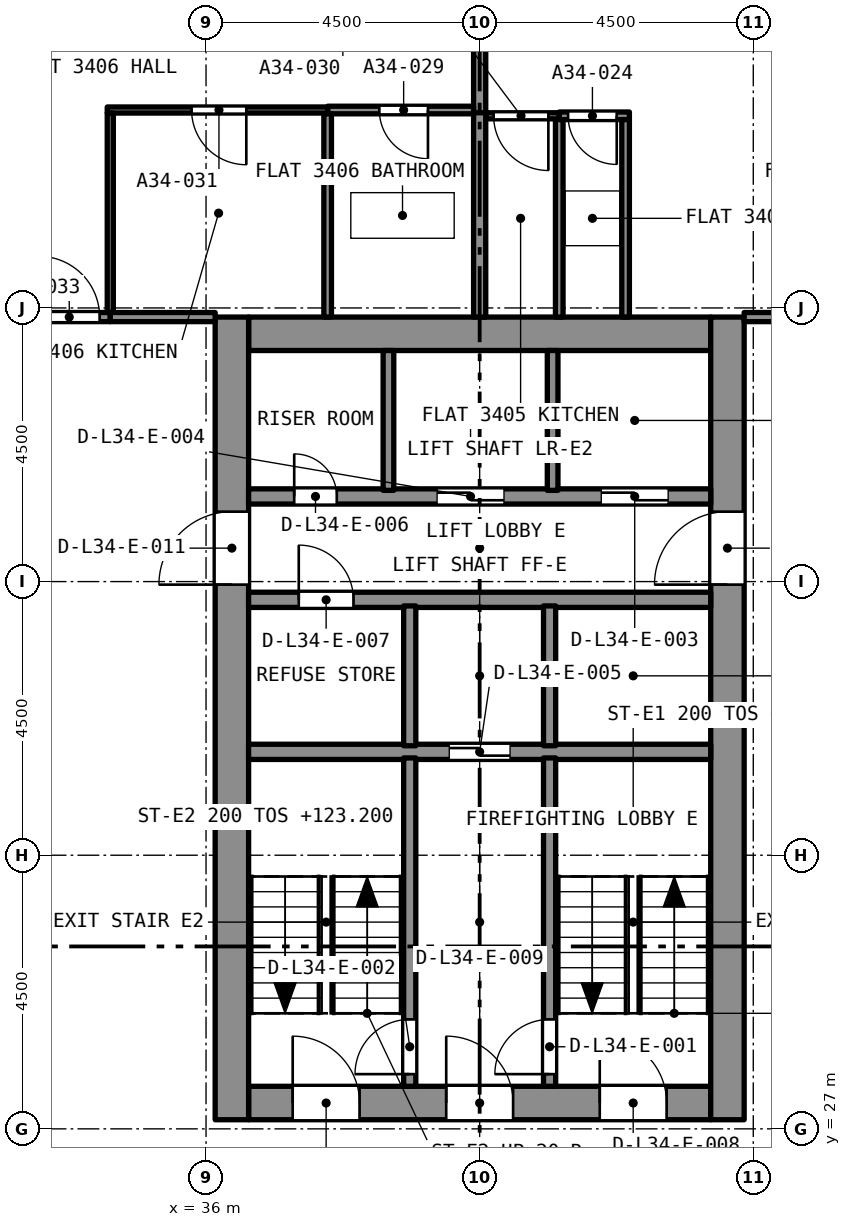
"""IFC4 building model, lengths in metres.
Left out: names, types, materials, properties, quantities, classifications, styles, units other than length and angle.
Written with IfcOpenShell. Run it as: python <this file> out.ifc"""

import sys

from ifc_helpers import new_model, si_unit, direction, frame, frame_2d, origin, place, context, subcontext, project, spatial, rectangle, extrude, element, fill, save


model = new_model("IFC4")
c1 = context("Model", 3, precision=1e-05, world=origin(), true_north=direction((0.0, 1.0)))
c2 = subcontext(c1, "Body", "Model", "MODEL_VIEW")
j1 = project(units=[si_unit("LENGTHUNIT", "METRE"), si_unit("PLANEANGLEUNIT", "RADIAN")], contexts=[c1])
p1 = place(None, origin())
s1 = spatial("IfcSite", under=j1, at=p1, CompositionType="ELEMENT")
p2 = place(p1, origin())
s2 = spatial("IfcBuilding", under=s1, at=p2, CompositionType="ELEMENT")
p3 = place(p2, frame((0.0, 0.0, 121.6)))
s3 = spatial("IfcBuildingStorey", under=s2, at=p3, CompositionType="ELEMENT", Elevation=121.6)
p4 = place(p3, frame((36.7, 27.425, 0.0), z_axis=(0.0, 0.0, 1.0), x_axis=(1.0, 0.0, 0.0)))
e1 = element("IfcWall", 1, at=p4, inside=s3, PredefinedType="SOLIDWALL", context=c2, shape_type="SweptSolid", body=[
    extrude(rectangle(XDim=7.6, YDim=0.55, at=frame_2d((3.8, 0.0))), origin(), (0.0, 0.0, 1.0), 3.2),
])
p5 = place(p4, frame((5.775, 0.0, 0.0)))
e2 = element("IfcOpeningElement", 2, at=p5, cuts=e1, PredefinedType="OPENING", context=c2, shape_type="SweptSolid", body=[
    extrude(rectangle(XDim=1.1, YDim=2.1, at=frame_2d((0.55, 1.05))), frame((0.0, 0.285, 0.0), z_axis=(0.0, -1.0, 0.0), x_axis=(1.0, 0.0, 0.0)), (0.0, 0.0, 1.0), 0.57),
])
p6 = place(p4, frame((3.25, 0.0, 0.0)))
e3 = element("IfcOpeningElement", 3, at=p6, cuts=e1, PredefinedType="OPENING", context=c2, shape_type="SweptSolid", body=[
    extrude(rectangle(XDim=1.1, YDim=2.1, at=frame_2d((0.55, 1.05))), frame((0.0, 0.285, 0.0), z_axis=(0.0, -1.0, 0.0), x_axis=(1.0, 0.0, 0.0)), (0.0, 0.0, 1.0), 0.57),
])
p7 = place(p4, frame((0.725, 0.0, 0.0)))
e4 = element("IfcOpeningElement", 4, at=p7, cuts=e1, PredefinedType="OPENING", context=c2, shape_type="SweptSolid", body=[
    extrude(rectangle(XDim=1.1, YDim=2.1, at=frame_2d((0.55, 1.05))), frame((0.0, 0.285, 0.0), z_axis=(0.0, -1.0, 0.0), x_axis=(1.0, 0.0, 0.0)), (0.0, 0.0, 1.0), 0.57),
])
p8 = place(p3, frame((36.7, 40.075, 0.0), z_axis=(0.0, 0.0, 1.0), x_axis=(1.0, 0.0, 0.0)))
e5 = element("IfcWall", 5, at=p8, inside=s3, PredefinedType="SOLIDWALL", context=c2, shape_type="SweptSolid", body=[
    extrude(rectangle(XDim=7.6, YDim=0.55, at=frame_2d((3.8, 0.0))), origin(), (0.0, 0.0, 1.0), 3.2),
])
p9 = place(p3, frame((36.425, 27.15, 0.0), z_axis=(0.0, 0.0, 1.0), x_axis=(0.0, 1.0, 0.0)))
e6 = element("IfcWall", 6, at=p9, inside=s3, PredefinedType="SOLIDWALL", context=c2, shape_type="SweptSolid", body=[
    extrude(rectangle(XDim=13.2, YDim=0.55, at=frame_2d((6.6, 0.0))), origin(), (0.0, 0.0, 1.0), 3.2),
])
p10 = place(p9, frame((8.8, 0.0, 0.0)))
e7 = element("IfcOpeningElement", 7, at=p10, cuts=e6, PredefinedType="OPENING", context=c2, shape_type="SweptSolid", body=[
    extrude(rectangle(XDim=1.2, YDim=2.1, at=frame_2d((0.6, 1.05))), frame((0.0, 0.285, 0.0), z_axis=(0.0, -1.0, 0.0), x_axis=(1.0, 0.0, 0.0)), (0.0, 0.0, 1.0), 0.57),
])
p11 = place(p3, frame((44.575, 27.15, 0.0), z_axis=(0.0, 0.0, 1.0), x_axis=(0.0, 1.0, 0.0)))
e8 = element("IfcWall", 8, at=p11, inside=s3, PredefinedType="SOLIDWALL", context=c2, shape_type="SweptSolid", body=[
    extrude(rectangle(XDim=13.2, YDim=0.55, at=frame_2d((6.6, 0.0))), origin(), (0.0, 0.0, 1.0), 3.2),
])
p12 = place(p11, frame((8.8, 0.0, 0.0)))
e9 = element("IfcOpeningElement", 9, at=p12, cuts=e8, PredefinedType="OPENING", context=c2, shape_type="SweptSolid", body=[
    extrude(rectangle(XDim=1.2, YDim=2.1, at=frame_2d((0.6, 1.05))), frame((0.0, 0.285, 0.0), z_axis=(0.0, -1.0, 0.0), x_axis=(1.0, 0.0, 0.0)), (0.0, 0.0, 1.0), 0.57),
])
p13 = place(p3, frame((42.962, 43.66, 0.0), z_axis=(0.0, 0.0, 1.0), x_axis=(-1.0, 0.0, 0.0)))
e10 = element("IfcWall", 10, at=p13, inside=s3, PredefinedType="PARTITIONING", context=c2, shape_type="SweptSolid", body=[
    extrude(rectangle(XDim=1.153, YDim=0.125, at=frame_2d((0.577, 0.0))), origin(), (0.0, 0.0, 1.0), 2.85),
])
p14 = place(p13, frame((0.208, 0.0, 0.0)))
e11 = element("IfcOpeningElement", 11, at=p14, cuts=e10, PredefinedType="OPENING", context=c2, shape_type="SweptSolid", body=[
    extrude(rectangle(XDim=0.8, YDim=2.1, at=frame_2d((0.4, 1.05))), frame((0.0, 0.073, 0.0), z_axis=(0.0, -1.0, 0.0), x_axis=(1.0, 0.0, 0.0)), (0.0, 0.0, 1.0), 0.145),
])
for number, where, z_axis, x_axis in (
    (12, (42.9, 40.35, 0.0), (0.0, 0.0, 1.0), (0.0, 1.0, 0.0)),
    (13, (41.809, 40.35, 0.0), (0.0, 0.0, 1.0), (0.0, 1.0, 0.0)),
):
    element("IfcWall", number, at=place(p3, frame(where, z_axis=z_axis, x_axis=x_axis)), inside=s3, PredefinedType="PARTITIONING", context=c2, shape_type="SweptSolid", body=[
        extrude(rectangle(XDim=3.247, YDim=0.125, at=frame_2d((1.624, 0.0))), origin(), (0.0, 0.0, 1.0), 2.85),
    ])
p15 = place(p3, frame((41.809, 43.66, 0.0), z_axis=(0.0, 0.0, 1.0), x_axis=(-1.0, 0.0, 0.0)))
e14 = element("IfcWall", 14, at=p15, inside=s3, PredefinedType="PARTITIONING", context=c2, shape_type="SweptSolid", body=[
    extrude(rectangle(XDim=1.209, YDim=0.1, at=frame_2d((0.604, 0.0))), origin(), (0.0, 0.0, 1.0), 2.85),
])
p16 = place(p15, frame((0.179, 0.0, 0.0)))
e15 = element("IfcOpeningElement", 15, at=p16, cuts=e14, PredefinedType="OPENING", context=c2, shape_type="SweptSolid", body=[
    extrude(rectangle(XDim=0.9, YDim=2.1, at=frame_2d((0.45, 1.05))), frame((0.0, 0.06, 0.0), z_axis=(0.0, -1.0, 0.0), x_axis=(1.0, 0.0, 0.0)), (0.0, 0.0, 1.0), 0.12),
])
p17 = place(p3, frame((40.5, 43.692, 0.0), z_axis=(0.0, 0.0, 1.0), x_axis=(0.0, 1.0, 0.0)))
e16 = element("IfcWall", 16, at=p17, inside=s3, PredefinedType="PARTITIONING", context=c2, shape_type="SweptSolid", body=[
    extrude(rectangle(XDim=1.358, YDim=0.2, at=frame_2d((0.679, 0.0))), origin(), (0.0, 0.0, 1.0), 2.85),
])
p18 = place(p3, frame((44.85, 40.35, 0.0), z_axis=(0.0, 0.0, 1.0), x_axis=(1.0, 0.0, 0.0)))
e17 = element("IfcWall", 17, at=p18, inside=s3, PredefinedType="PARTITIONING", context=c2, shape_type="SweptSolid", body=[
    extrude(rectangle(XDim=4.075, YDim=0.15, at=frame_2d((2.038, 0.0))), origin(), (0.0, 0.0, 1.0), 2.85),
])
p19 = place(p18, frame((1.9, 0.0, 0.0)))
e18 = element("IfcOpeningElement", 18, at=p19, cuts=e17, PredefinedType="OPENING", context=c2, shape_type="SweptSolid", body=[
    extrude(rectangle(XDim=1.0, YDim=2.1, at=frame_2d((0.5, 1.05))), frame((0.0, 0.085, 0.0), z_axis=(0.0, -1.0, 0.0), x_axis=(1.0, 0.0, 0.0)), (0.0, 0.0, 1.0), 0.17),
])
p20 = place(p3, frame((40.5, 40.35, 0.0), z_axis=(0.0, 0.0, 1.0), x_axis=(0.0, 1.0, 0.0)))
e19 = element("IfcWall", 19, at=p20, inside=s3, PredefinedType="PARTITIONING", context=c2, shape_type="SweptSolid", body=[
    extrude(rectangle(XDim=3.36, YDim=0.2, at=frame_2d((1.68, 0.0))), origin(), (0.0, 0.0, 1.0), 2.85),
])
p21 = place(p3, frame((40.4, 43.755, 0.0), z_axis=(0.0, 0.0, 1.0), x_axis=(-1.0, 0.0, 0.0)))
e20 = element("IfcWall", 20, at=p21, inside=s3, PredefinedType="PARTITIONING", context=c2, shape_type="SweptSolid", body=[
    extrude(rectangle(XDim=2.4, YDim=0.125, at=frame_2d((1.2, 0.0))), origin(), (0.0, 0.0, 1.0), 2.85),
])
p22 = place(p21, frame((0.75, 0.0, 0.0)))
e21 = element("IfcOpeningElement", 21, at=p22, cuts=e20, PredefinedType="OPENING", context=c2, shape_type="SweptSolid", body=[
    extrude(rectangle(XDim=0.8, YDim=2.1, at=frame_2d((0.4, 1.05))), frame((0.0, 0.073, 0.0), z_axis=(0.0, -1.0, 0.0), x_axis=(1.0, 0.0, 0.0)), (0.0, 0.0, 1.0), 0.145),
])
p23 = place(p3, frame((38.0, 40.35, 0.0), z_axis=(0.0, 0.0, 1.0), x_axis=(0.0, 1.0, 0.0)))
e22 = element("IfcWall", 22, at=p23, inside=s3, PredefinedType="PARTITIONING", context=c2, shape_type="SweptSolid", body=[
    extrude(rectangle(XDim=3.342, YDim=0.125, at=frame_2d((1.671, 0.0))), origin(), (0.0, 0.0, 1.0), 2.85),
])
p24 = place(p3, frame((38.0, 43.755, 0.0), z_axis=(0.0, 0.0, 1.0), x_axis=(-1.0, 0.0, 0.0)))
e23 = element("IfcWall", 23, at=p24, inside=s3, PredefinedType="PARTITIONING", context=c2, shape_type="SweptSolid", body=[
    extrude(rectangle(XDim=3.625, YDim=0.1, at=frame_2d((1.812, 0.0))), origin(), (0.0, 0.0, 1.0), 2.85),
])
p25 = place(p24, frame((1.337, 0.0, 0.0)))
e24 = element("IfcOpeningElement", 24, at=p25, cuts=e23, PredefinedType="OPENING", context=c2, shape_type="SweptSolid", body=[
    extrude(rectangle(XDim=0.9, YDim=2.1, at=frame_2d((0.45, 1.05))), frame((0.0, 0.06, 0.0), z_axis=(0.0, -1.0, 0.0), x_axis=(1.0, 0.0, 0.0)), (0.0, 0.0, 1.0), 0.12),
])
p26 = place(p3, frame((34.425, 40.425, 0.0), z_axis=(0.0, 0.0, 1.0), x_axis=(0.0, 1.0, 0.0)))
e25 = element("IfcWall", 25, at=p26, inside=s3, PredefinedType="PARTITIONING", context=c2, shape_type="SweptSolid", body=[
    extrude(rectangle(XDim=3.28, YDim=0.1, at=frame_2d((1.64, 0.0))), origin(), (0.0, 0.0, 1.0), 2.85),
])
p27 = place(p3, frame((32.075, 40.35, 0.0), z_axis=(0.0, 0.0, 1.0), x_axis=(1.0, 0.0, 0.0)))
e26 = element("IfcWall", 26, at=p27, inside=s3, PredefinedType="PARTITIONING", context=c2, shape_type="SweptSolid", body=[
    extrude(rectangle(XDim=2.35, YDim=0.15, at=frame_2d((1.175, 0.0))), origin(), (0.0, 0.0, 1.0), 2.85),
])
p28 = place(p27, frame((1.175, 0.0, 0.0)))
e27 = element("IfcOpeningElement", 27, at=p28, cuts=e26, PredefinedType="OPENING", context=c2, shape_type="SweptSolid", body=[
    extrude(rectangle(XDim=1.0, YDim=2.1, at=frame_2d((0.5, 1.05))), frame((0.0, 0.085, 0.0), z_axis=(0.0, -1.0, 0.0), x_axis=(1.0, 0.0, 0.0)), (0.0, 0.0, 1.0), 0.17),
])
p29 = place(p3, frame((34.425, 40.35, 0.0), z_axis=(0.0, 0.0, 1.0), x_axis=(1.0, 0.0, 0.0)))
e28 = element("IfcWall", 28, at=p29, inside=s3, PredefinedType="PARTITIONING", context=c2, shape_type="SweptSolid", body=[
    extrude(rectangle(XDim=1.725, YDim=0.15, at=frame_2d((0.862, 0.0))), origin(), (0.0, 0.0, 1.0), 2.85),
])
p30 = place(p3, frame((36.7, 33.2, 0.0), z_axis=(0.0, 0.0, 1.0), x_axis=(1.0, 0.0, 0.0)))
e29 = element("IfcWall", 29, at=p30, inside=s3, PredefinedType="SOLIDWALL", context=c2, shape_type="SweptSolid", body=[
    extrude(rectangle(XDim=7.6, YDim=0.25, at=frame_2d((3.8, 0.0))), origin(), (0.0, 0.0, 1.0), 2.85),
])
p31 = place(p30, frame((3.3, 0.0, 0.0)))
e30 = element("IfcOpeningElement", 30, at=p31, cuts=e29, PredefinedType="OPENING", context=c2, shape_type="SweptSolid", body=[
    extrude(rectangle(XDim=1.0, YDim=2.1, at=frame_2d((0.5, 1.05))), frame((0.0, 0.135, 0.0), z_axis=(0.0, -1.0, 0.0), x_axis=(1.0, 0.0, 0.0)), (0.0, 0.0, 1.0), 0.27),
])
p32 = place(p3, frame((36.7, 35.7, 0.0), z_axis=(0.0, 0.0, 1.0), x_axis=(1.0, 0.0, 0.0)))
e31 = element("IfcWall", 31, at=p32, inside=s3, PredefinedType="SOLIDWALL", context=c2, shape_type="SweptSolid", body=[
    extrude(rectangle(XDim=7.6, YDim=0.25, at=frame_2d((3.8, 0.0))), origin(), (0.0, 0.0, 1.0), 2.85),
])
p33 = place(p32, frame((0.825, 0.0, 0.0)))
e32 = element("IfcOpeningElement", 32, at=p33, cuts=e31, PredefinedType="OPENING", context=c2, shape_type="SweptSolid", body=[
    extrude(rectangle(XDim=0.9, YDim=2.1, at=frame_2d((0.45, 1.05))), frame((0.0, 0.135, 0.0), z_axis=(0.0, -1.0, 0.0), x_axis=(1.0, 0.0, 0.0)), (0.0, 0.0, 1.0), 0.27),
])
p34 = place(p3, frame((36.7, 37.4, 0.0), z_axis=(0.0, 0.0, 1.0), x_axis=(1.0, 0.0, 0.0)))
e33 = element("IfcWall", 33, at=p34, inside=s3, PredefinedType="SOLIDWALL", context=c2, shape_type="SweptSolid", body=[
    extrude(rectangle(XDim=7.6, YDim=0.25, at=frame_2d((3.8, 0.0))), origin(), (0.0, 0.0, 1.0), 2.85),
])
p35 = place(p34, frame((5.8, 0.0, 0.0)))
e34 = element("IfcOpeningElement", 34, at=p35, cuts=e33, PredefinedType="OPENING", context=c2, shape_type="SweptSolid", body=[
    extrude(rectangle(XDim=1.1, YDim=2.4, at=frame_2d((0.55, 1.2))), frame((0.0, 0.135, 0.0), z_axis=(0.0, -1.0, 0.0), x_axis=(1.0, 0.0, 0.0)), (0.0, 0.0, 1.0), 0.27),
])
p36 = place(p34, frame((3.1, 0.0, 0.0)))
e35 = element("IfcOpeningElement", 35, at=p36, cuts=e33, PredefinedType="OPENING", context=c2, shape_type="SweptSolid", body=[
    extrude(rectangle(XDim=1.1, YDim=2.4, at=frame_2d((0.55, 1.2))), frame((0.0, 0.135, 0.0), z_axis=(0.0, -1.0, 0.0), x_axis=(1.0, 0.0, 0.0)), (0.0, 0.0, 1.0), 0.27),
])
p37 = place(p34, frame((0.75, 0.0, 0.0)))
e36 = element("IfcOpeningElement", 36, at=p37, cuts=e33, PredefinedType="OPENING", context=c2, shape_type="SweptSolid", body=[
    extrude(rectangle(XDim=0.7, YDim=2.1, at=frame_2d((0.35, 1.05))), frame((0.0, 0.135, 0.0), z_axis=(0.0, -1.0, 0.0), x_axis=(1.0, 0.0, 0.0)), (0.0, 0.0, 1.0), 0.27),
])
p38 = place(p3, frame((41.65, 27.7, 0.0), z_axis=(0.0, 0.0, 1.0), x_axis=(0.0, 1.0, 0.0)))
e37 = element("IfcWall", 37, at=p38, inside=s3, PredefinedType="SOLIDWALL", context=c2, shape_type="SweptSolid", body=[
    extrude(rectangle(XDim=5.4, YDim=0.2, at=frame_2d((2.7, 0.0))), origin(), (0.0, 0.0, 1.0), 2.85),
])
p39 = place(p38, frame((0.2, 0.0, 0.0)))
e38 = element("IfcOpeningElement", 38, at=p39, cuts=e37, PredefinedType="OPENING", context=c2, shape_type="SweptSolid", body=[
    extrude(rectangle(XDim=0.9, YDim=2.1, at=frame_2d((0.45, 1.05))), frame((0.0, 0.11, 0.0), z_axis=(0.0, -1.0, 0.0), x_axis=(1.0, 0.0, 0.0)), (0.0, 0.0, 1.0), 0.22),
])
p40 = place(p3, frame((39.35, 27.7, 0.0), z_axis=(0.0, 0.0, 1.0), x_axis=(0.0, 1.0, 0.0)))
e39 = element("IfcWall", 39, at=p40, inside=s3, PredefinedType="SOLIDWALL", context=c2, shape_type="SweptSolid", body=[
    extrude(rectangle(XDim=5.4, YDim=0.2, at=frame_2d((2.7, 0.0))), origin(), (0.0, 0.0, 1.0), 2.85),
])
p41 = place(p40, frame((0.2, 0.0, 0.0)))
e40 = element("IfcOpeningElement", 40, at=p41, cuts=e39, PredefinedType="OPENING", context=c2, shape_type="SweptSolid", body=[
    extrude(rectangle(XDim=0.9, YDim=2.1, at=frame_2d((0.45, 1.05))), frame((0.0, 0.11, 0.0), z_axis=(0.0, -1.0, 0.0), x_axis=(1.0, 0.0, 0.0)), (0.0, 0.0, 1.0), 0.22),
])
for number, where, z_axis, x_axis in (
    (41, (41.65, 33.3, 0.0), (0.0, 0.0, 1.0), (0.0, 1.0, 0.0)),
    (42, (39.35, 33.3, 0.0), (0.0, 0.0, 1.0), (0.0, 1.0, 0.0)),
):
    element("IfcWall", number, at=place(p3, frame(where, z_axis=z_axis, x_axis=x_axis)), inside=s3, PredefinedType="SOLIDWALL", context=c2, shape_type="SweptSolid", body=[
        extrude(rectangle(XDim=2.3, YDim=0.2, at=frame_2d((1.15, 0.0))), origin(), (0.0, 0.0, 1.0), 2.85),
    ])
for number, where, z_axis, x_axis in (
    (43, (41.7, 37.5, 0.0), (0.0, 0.0, 1.0), (0.0, 1.0, 0.0)),
    (44, (39.0, 37.5, 0.0), (0.0, 0.0, 1.0), (0.0, 1.0, 0.0)),
):
    element("IfcWall", number, at=place(p3, frame(where, z_axis=z_axis, x_axis=x_axis)), inside=s3, PredefinedType="SOLIDWALL", context=c2, shape_type="SweptSolid", body=[
        extrude(rectangle(XDim=2.3, YDim=0.175, at=frame_2d((1.15, 0.0))), origin(), (0.0, 0.0, 1.0), 2.85),
    ])
p42 = place(p14, origin())
e45 = element("IfcDoor", 45, at=p42, inside=s3, OperationType="SINGLE_SWING_RIGHT", PredefinedType="DOOR", context=c2, shape_type="SweptSolid", body=[
    extrude(rectangle(XDim=0.8, YDim=2.1, at=frame_2d((0.4, 1.05))), frame((0.0, 0.025, 0.0), z_axis=(0.0, -1.0, 0.0), x_axis=(1.0, 0.0, 0.0)), (0.0, 0.0, 1.0), 0.05),
])
fill(e11, e45)
p43 = place(p16, origin())
e46 = element("IfcDoor", 46, at=p43, inside=s3, OperationType="SINGLE_SWING_RIGHT", PredefinedType="DOOR", context=c2, shape_type="SweptSolid", body=[
    extrude(rectangle(XDim=0.9, YDim=2.1, at=frame_2d((0.45, 1.05))), frame((0.0, 0.025, 0.0), z_axis=(0.0, -1.0, 0.0), x_axis=(1.0, 0.0, 0.0)), (0.0, 0.0, 1.0), 0.05),
])
fill(e15, e46)
p44 = place(p22, origin())
e47 = element("IfcDoor", 47, at=p44, inside=s3, OperationType="SINGLE_SWING_LEFT", PredefinedType="DOOR", context=c2, shape_type="SweptSolid", body=[
    extrude(rectangle(XDim=0.8, YDim=2.1, at=frame_2d((0.4, 1.05))), frame((0.0, 0.025, 0.0), z_axis=(0.0, -1.0, 0.0), x_axis=(1.0, 0.0, 0.0)), (0.0, 0.0, 1.0), 0.05),
])
fill(e21, e47)
p45 = place(p25, origin())
e48 = element("IfcDoor", 48, at=p45, inside=s3, OperationType="SINGLE_SWING_LEFT", PredefinedType="DOOR", context=c2, shape_type="SweptSolid", body=[
    extrude(rectangle(XDim=0.9, YDim=2.1, at=frame_2d((0.45, 1.05))), frame((0.0, 0.025, 0.0), z_axis=(0.0, -1.0, 0.0), x_axis=(1.0, 0.0, 0.0)), (0.0, 0.0, 1.0), 0.05),
])
fill(e24, e48)
p46 = place(p28, origin())
e49 = element("IfcDoor", 49, at=p46, inside=s3, OperationType="SINGLE_SWING_RIGHT", PredefinedType="DOOR", context=c2, shape_type="SweptSolid", body=[
    extrude(rectangle(XDim=1.0, YDim=2.1, at=frame_2d((0.5, 1.05))), frame((0.0, 0.025, 0.0), z_axis=(0.0, -1.0, 0.0), x_axis=(1.0, 0.0, 0.0)), (0.0, 0.0, 1.0), 0.05),
])
fill(e27, e49)
p47 = place(p39, origin())
e50 = element("IfcDoor", 50, at=p47, inside=s3, OperationType="SINGLE_SWING_LEFT", PredefinedType="DOOR", context=c2, shape_type="SweptSolid", body=[
    extrude(rectangle(XDim=0.9, YDim=2.1, at=frame_2d((0.45, 1.05))), frame((0.0, 0.025, 0.0), z_axis=(0.0, -1.0, 0.0), x_axis=(1.0, 0.0, 0.0)), (0.0, 0.0, 1.0), 0.05),
])
fill(e38, e50)
p48 = place(p41, origin())
e51 = element("IfcDoor", 51, at=p48, inside=s3, OperationType="SINGLE_SWING_LEFT", PredefinedType="DOOR", context=c2, shape_type="SweptSolid", body=[
    extrude(rectangle(XDim=0.9, YDim=2.1, at=frame_2d((0.45, 1.05))), frame((0.0, 0.025, 0.0), z_axis=(0.0, -1.0, 0.0), x_axis=(1.0, 0.0, 0.0)), (0.0, 0.0, 1.0), 0.05),
])
fill(e40, e51)
p49 = place(p35, origin())
e52 = element("IfcDoor", 52, at=p49, inside=s3, OperationType="SLIDING_TO_LEFT", PredefinedType="DOOR", context=c2, shape_type="SweptSolid", body=[
    extrude(rectangle(XDim=1.1, YDim=2.4, at=frame_2d((0.55, 1.2))), frame((0.0, 0.025, 0.0), z_axis=(0.0, -1.0, 0.0), x_axis=(1.0, 0.0, 0.0)), (0.0, 0.0, 1.0), 0.05),
])
fill(e34, e52)
p50 = place(p36, origin())
e53 = element("IfcDoor", 53, at=p50, inside=s3, OperationType="SLIDING_TO_LEFT", PredefinedType="DOOR", context=c2, shape_type="SweptSolid", body=[
    extrude(rectangle(XDim=1.1, YDim=2.4, at=frame_2d((0.55, 1.2))), frame((0.0, 0.025, 0.0), z_axis=(0.0, -1.0, 0.0), x_axis=(1.0, 0.0, 0.0)), (0.0, 0.0, 1.0), 0.05),
])
fill(e35, e53)
p51 = place(p31, origin())
e54 = element("IfcDoor", 54, at=p51, inside=s3, OperationType="SLIDING_TO_LEFT", PredefinedType="DOOR", context=c2, shape_type="SweptSolid", body=[
    extrude(rectangle(XDim=1.0, YDim=2.1, at=frame_2d((0.5, 1.05))), frame((0.0, 0.025, 0.0), z_axis=(0.0, -1.0, 0.0), x_axis=(1.0, 0.0, 0.0)), (0.0, 0.0, 1.0), 0.05),
])
fill(e30, e54)
p52 = place(p37, origin())
e55 = element("IfcDoor", 55, at=p52, inside=s3, OperationType="SINGLE_SWING_LEFT", PredefinedType="DOOR", context=c2, shape_type="SweptSolid", body=[
    extrude(rectangle(XDim=0.7, YDim=2.1, at=frame_2d((0.35, 1.05))), frame((0.0, 0.025, 0.0), z_axis=(0.0, -1.0, 0.0), x_axis=(1.0, 0.0, 0.0)), (0.0, 0.0, 1.0), 0.05),
])
fill(e36, e55)
p53 = place(p33, origin())
e56 = element("IfcDoor", 56, at=p53, inside=s3, OperationType="SINGLE_SWING_LEFT", PredefinedType="DOOR", context=c2, shape_type="SweptSolid", body=[
    extrude(rectangle(XDim=0.9, YDim=2.1, at=frame_2d((0.45, 1.05))), frame((0.0, 0.025, 0.0), z_axis=(0.0, -1.0, 0.0), x_axis=(1.0, 0.0, 0.0)), (0.0, 0.0, 1.0), 0.05),
])
fill(e32, e56)
p54 = place(p5, origin())
e57 = element("IfcDoor", 57, at=p54, inside=s3, OperationType="SINGLE_SWING_LEFT", PredefinedType="DOOR", context=c2, shape_type="SweptSolid", body=[
    extrude(rectangle(XDim=1.1, YDim=2.1, at=frame_2d((0.55, 1.05))), frame((0.0, 0.025, 0.0), z_axis=(0.0, -1.0, 0.0), x_axis=(1.0, 0.0, 0.0)), (0.0, 0.0, 1.0), 0.05),
])
fill(e2, e57)
p55 = place(p6, origin())
e58 = element("IfcDoor", 58, at=p55, inside=s3, OperationType="SINGLE_SWING_LEFT", PredefinedType="DOOR", context=c2, shape_type="SweptSolid", body=[
    extrude(rectangle(XDim=1.1, YDim=2.1, at=frame_2d((0.55, 1.05))), frame((0.0, 0.025, 0.0), z_axis=(0.0, -1.0, 0.0), x_axis=(1.0, 0.0, 0.0)), (0.0, 0.0, 1.0), 0.05),
])
fill(e3, e58)
p56 = place(p7, origin())
e59 = element("IfcDoor", 59, at=p56, inside=s3, OperationType="SINGLE_SWING_LEFT", PredefinedType="DOOR", context=c2, shape_type="SweptSolid", body=[
    extrude(rectangle(XDim=1.1, YDim=2.1, at=frame_2d((0.55, 1.05))), frame((0.0, 0.025, 0.0), z_axis=(0.0, -1.0, 0.0), x_axis=(1.0, 0.0, 0.0)), (0.0, 0.0, 1.0), 0.05),
])
fill(e4, e59)
p57 = place(p10, origin())
e60 = element("IfcDoor", 60, at=p57, inside=s3, OperationType="SINGLE_SWING_LEFT", PredefinedType="DOOR", context=c2, shape_type="SweptSolid", body=[
    extrude(rectangle(XDim=1.2, YDim=2.1, at=frame_2d((0.6, 1.05))), frame((0.0, 0.025, 0.0), z_axis=(0.0, -1.0, 0.0), x_axis=(1.0, 0.0, 0.0)), (0.0, 0.0, 1.0), 0.05),
])
fill(e7, e60)
p58 = place(p12, origin())
e61 = element("IfcDoor", 61, at=p58, inside=s3, OperationType="SINGLE_SWING_LEFT", PredefinedType="DOOR", context=c2, shape_type="SweptSolid", body=[
    extrude(rectangle(XDim=1.2, YDim=2.1, at=frame_2d((0.6, 1.05))), frame((0.0, 0.025, 0.0), z_axis=(0.0, -1.0, 0.0), x_axis=(1.0, 0.0, 0.0)), (0.0, 0.0, 1.0), 0.05),
])
fill(e9, e61)
save(model, sys.argv[1])
